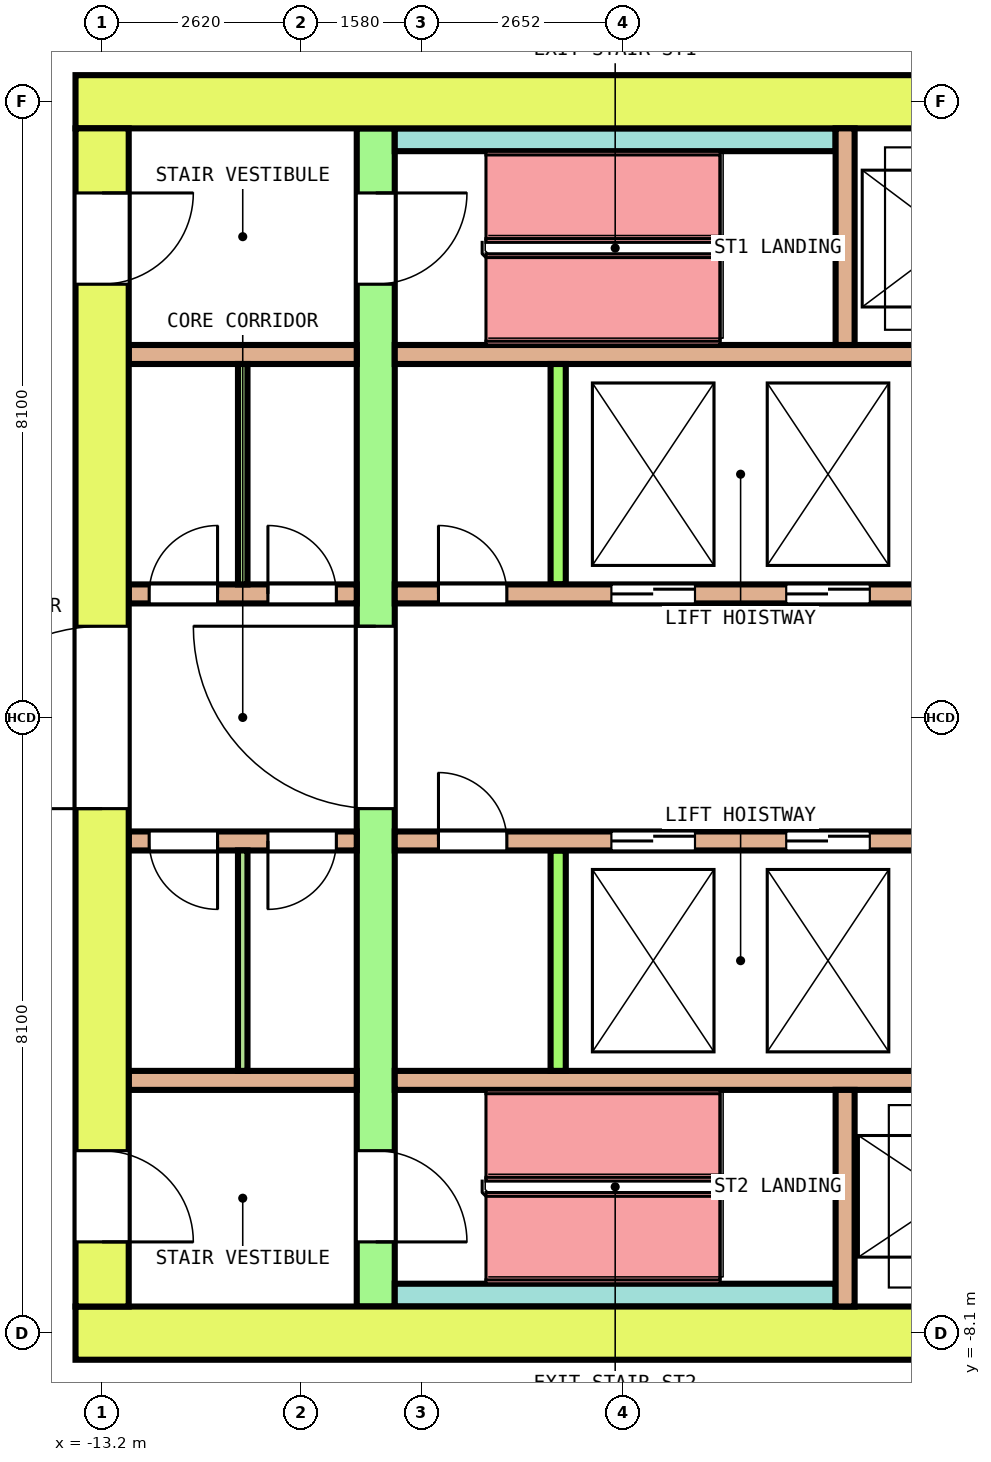
"""IFC4 building model, lengths in metres.
Left out: names, types, materials, properties, quantities, classifications, styles, units other than length and angle.
Written with IfcOpenShell. Run it as: python <this file> out.ifc"""

import sys

from ifc_helpers import new_model, si_unit, direction, frame, frame_2d, origin, place, context, subcontext, project, spatial, rectangle, extrude, element, fill, save


model = new_model("IFC4")
c1 = context("Model", 3, precision=1e-05, world=origin(), true_north=direction((0.0, 1.0)))
c2 = subcontext(c1, "Body", "Model", "MODEL_VIEW")
j1 = project(units=[si_unit("LENGTHUNIT", "METRE"), si_unit("PLANEANGLEUNIT", "RADIAN")], contexts=[c1])
p1 = place(None, origin())
s1 = spatial("IfcSite", under=j1, at=p1, CompositionType="ELEMENT")
p2 = place(p1, origin())
s2 = spatial("IfcBuilding", under=s1, at=p2, CompositionType="ELEMENT")
p3 = place(p2, frame((0.0, 0.0, 198.0)))
s3 = spatial("IfcBuildingStorey", under=s2, at=p3, CompositionType="ELEMENT", Elevation=198.0)
p4 = place(p3, frame((-13.55, 8.1, 0.0), z_axis=(0.0, 0.0, 1.0), x_axis=(1.0, 0.0, 0.0)))
e1 = element("IfcWall", 1, at=p4, inside=s3, PredefinedType="SHEAR", context=c2, shape_type="SweptSolid", body=[
    extrude(rectangle(XDim=27.1, YDim=0.7, at=frame_2d((13.55, 0.0))), origin(), (0.0, 0.0, 1.0), 4.1),
])
p5 = place(p4, frame((14.475, 0.0, 0.0)))
e2 = element("IfcOpeningElement", 2, at=p5, cuts=e1, PredefinedType="OPENING", context=c2, shape_type="SweptSolid", body=[
    extrude(rectangle(XDim=1.4, YDim=2.1, at=frame_2d((0.7, 1.05))), frame((0.0, 0.36, 0.0), z_axis=(0.0, -1.0, 0.0), x_axis=(1.0, 0.0, 0.0)), (0.0, 0.0, 1.0), 0.72),
])
p6 = place(p3, frame((-13.55, -8.1, 0.0), z_axis=(0.0, 0.0, 1.0), x_axis=(1.0, 0.0, 0.0)))
e3 = element("IfcWall", 3, at=p6, inside=s3, PredefinedType="SHEAR", context=c2, shape_type="SweptSolid", body=[
    extrude(rectangle(XDim=27.1, YDim=0.7, at=frame_2d((13.55, 0.0))), origin(), (0.0, 0.0, 1.0), 4.1),
])
p7 = place(p6, frame((15.1, 0.0, 0.0)))
e4 = element("IfcOpeningElement", 4, at=p7, cuts=e3, PredefinedType="OPENING", context=c2, shape_type="SweptSolid", body=[
    extrude(rectangle(XDim=1.2, YDim=2.1, at=frame_2d((0.6, 1.05))), frame((0.0, 0.36, 0.0), z_axis=(0.0, -1.0, 0.0), x_axis=(1.0, 0.0, 0.0)), (0.0, 0.0, 1.0), 0.72),
])
p8 = place(p3, frame((-13.2, -7.75, 0.0), z_axis=(0.0, 0.0, 1.0), x_axis=(0.0, 1.0, 0.0)))
e5 = element("IfcWall", 5, at=p8, inside=s3, PredefinedType="SHEAR", context=c2, shape_type="SweptSolid", body=[
    extrude(rectangle(XDim=15.5, YDim=0.7, at=frame_2d((7.75, 0.0))), origin(), (0.0, 0.0, 1.0), 4.1),
])
p9 = place(p8, frame((6.55, 0.0, 0.0)))
e6 = element("IfcOpeningElement", 6, at=p9, cuts=e5, PredefinedType="OPENING", context=c2, shape_type="SweptSolid", body=[
    extrude(rectangle(XDim=2.4, YDim=2.1, at=frame_2d((1.2, 1.05))), frame((0.0, 0.36, 0.0), z_axis=(0.0, -1.0, 0.0), x_axis=(1.0, 0.0, 0.0)), (0.0, 0.0, 1.0), 0.72),
])
p10 = place(p8, frame((13.45, 0.0, 0.0)))
e7 = element("IfcOpeningElement", 7, at=p10, cuts=e5, PredefinedType="OPENING", context=c2, shape_type="SweptSolid", body=[
    extrude(rectangle(XDim=1.2, YDim=2.1, at=frame_2d((0.6, 1.05))), frame((0.0, 0.36, 0.0), z_axis=(0.0, -1.0, 0.0), x_axis=(1.0, 0.0, 0.0)), (0.0, 0.0, 1.0), 0.72),
])
p11 = place(p8, frame((0.85, 0.0, 0.0)))
e8 = element("IfcOpeningElement", 8, at=p11, cuts=e5, PredefinedType="OPENING", context=c2, shape_type="SweptSolid", body=[
    extrude(rectangle(XDim=1.2, YDim=2.1, at=frame_2d((0.6, 1.05))), frame((0.0, 0.36, 0.0), z_axis=(0.0, -1.0, 0.0), x_axis=(1.0, 0.0, 0.0)), (0.0, 0.0, 1.0), 0.72),
])
p12 = place(p3, frame((-9.6, -7.75, 0.0), z_axis=(0.0, 0.0, 1.0), x_axis=(0.0, 1.0, 0.0)))
e9 = element("IfcWall", 9, at=p12, inside=s3, PredefinedType="SHEAR", context=c2, shape_type="SweptSolid", body=[
    extrude(rectangle(XDim=15.5, YDim=0.5, at=frame_2d((7.75, 0.0))), origin(), (0.0, 0.0, 1.0), 4.1),
])
p13 = place(p12, frame((6.55, 0.0, 0.0)))
e10 = element("IfcOpeningElement", 10, at=p13, cuts=e9, PredefinedType="OPENING", context=c2, shape_type="SweptSolid", body=[
    extrude(rectangle(XDim=2.4, YDim=2.1, at=frame_2d((1.2, 1.05))), frame((0.0, 0.26, 0.0), z_axis=(0.0, -1.0, 0.0), x_axis=(1.0, 0.0, 0.0)), (0.0, 0.0, 1.0), 0.52),
])
p14 = place(p12, frame((13.45, 0.0, 0.0)))
e11 = element("IfcOpeningElement", 11, at=p14, cuts=e9, PredefinedType="OPENING", context=c2, shape_type="SweptSolid", body=[
    extrude(rectangle(XDim=1.2, YDim=2.1, at=frame_2d((0.6, 1.05))), frame((0.0, 0.26, 0.0), z_axis=(0.0, -1.0, 0.0), x_axis=(1.0, 0.0, 0.0)), (0.0, 0.0, 1.0), 0.52),
])
p15 = place(p12, frame((0.85, 0.0, 0.0)))
e12 = element("IfcOpeningElement", 12, at=p15, cuts=e9, PredefinedType="OPENING", context=c2, shape_type="SweptSolid", body=[
    extrude(rectangle(XDim=1.2, YDim=2.1, at=frame_2d((0.6, 1.05))), frame((0.0, 0.26, 0.0), z_axis=(0.0, -1.0, 0.0), x_axis=(1.0, 0.0, 0.0)), (0.0, 0.0, 1.0), 0.52),
])
p16 = place(p3, frame((-12.85, 1.625, 0.0), z_axis=(0.0, 0.0, 1.0), x_axis=(1.0, 0.0, 0.0)))
e13 = element("IfcWall", 13, at=p16, inside=s3, PredefinedType="SOLIDWALL", context=c2, shape_type="SweptSolid", body=[
    extrude(rectangle(XDim=3.0, YDim=0.25, at=frame_2d((1.5, 0.0))), origin(), (0.0, 0.0, 1.0), 4.1),
])
p17 = place(p16, frame((0.269, 0.0, 0.0)))
e14 = element("IfcOpeningElement", 14, at=p17, cuts=e13, PredefinedType="OPENING", context=c2, shape_type="SweptSolid", body=[
    extrude(rectangle(XDim=0.9, YDim=2.1, at=frame_2d((0.45, 1.05))), frame((0.0, 0.135, 0.0), z_axis=(0.0, -1.0, 0.0), x_axis=(1.0, 0.0, 0.0)), (0.0, 0.0, 1.0), 0.27),
])
p18 = place(p16, frame((1.831, 0.0, 0.0)))
e15 = element("IfcOpeningElement", 15, at=p18, cuts=e13, PredefinedType="OPENING", context=c2, shape_type="SweptSolid", body=[
    extrude(rectangle(XDim=0.9, YDim=2.1, at=frame_2d((0.45, 1.05))), frame((0.0, 0.135, 0.0), z_axis=(0.0, -1.0, 0.0), x_axis=(1.0, 0.0, 0.0)), (0.0, 0.0, 1.0), 0.27),
])
p19 = place(p3, frame((-9.35, 1.625, 0.0), z_axis=(0.0, 0.0, 1.0), x_axis=(1.0, 0.0, 0.0)))
e16 = element("IfcWall", 16, at=p19, inside=s3, PredefinedType="SOLIDWALL", context=c2, shape_type="SweptSolid", body=[
    extrude(rectangle(XDim=18.7, YDim=0.25, at=frame_2d((9.35, 0.0))), origin(), (0.0, 0.0, 1.0), 4.1),
])
p20 = place(p19, frame((2.85, 0.0, 0.0)))
e17 = element("IfcOpeningElement", 17, at=p20, cuts=e16, PredefinedType="OPENING", context=c2, shape_type="SweptSolid", body=[
    extrude(rectangle(XDim=1.1, YDim=2.1, at=frame_2d((0.55, 1.05))), frame((0.0, 0.135, 0.0), z_axis=(0.0, -1.0, 0.0), x_axis=(1.0, 0.0, 0.0)), (0.0, 0.0, 1.0), 0.27),
])
p21 = place(p19, frame((5.15, 0.0, 0.0)))
e18 = element("IfcOpeningElement", 18, at=p21, cuts=e16, PredefinedType="OPENING", context=c2, shape_type="SweptSolid", body=[
    extrude(rectangle(XDim=1.1, YDim=2.1, at=frame_2d((0.55, 1.05))), frame((0.0, 0.135, 0.0), z_axis=(0.0, -1.0, 0.0), x_axis=(1.0, 0.0, 0.0)), (0.0, 0.0, 1.0), 0.27),
])
p22 = place(p19, frame((14.8, 0.0, 0.0)))
e19 = element("IfcOpeningElement", 19, at=p22, cuts=e16, PredefinedType="OPENING", context=c2, shape_type="SweptSolid", body=[
    extrude(rectangle(XDim=1.1, YDim=2.1, at=frame_2d((0.55, 1.05))), frame((0.0, 0.135, 0.0), z_axis=(0.0, -1.0, 0.0), x_axis=(1.0, 0.0, 0.0)), (0.0, 0.0, 1.0), 0.27),
])
p23 = place(p19, frame((0.575, 0.0, 0.0)))
e20 = element("IfcOpeningElement", 20, at=p23, cuts=e16, PredefinedType="OPENING", context=c2, shape_type="SweptSolid", body=[
    extrude(rectangle(XDim=0.9, YDim=2.1, at=frame_2d((0.45, 1.05))), frame((0.0, 0.135, 0.0), z_axis=(0.0, -1.0, 0.0), x_axis=(1.0, 0.0, 0.0)), (0.0, 0.0, 1.0), 0.27),
])
p24 = place(p19, frame((17.225, 0.0, 0.0)))
e21 = element("IfcOpeningElement", 21, at=p24, cuts=e16, PredefinedType="OPENING", context=c2, shape_type="SweptSolid", body=[
    extrude(rectangle(XDim=0.9, YDim=2.1, at=frame_2d((0.45, 1.05))), frame((0.0, 0.135, 0.0), z_axis=(0.0, -1.0, 0.0), x_axis=(1.0, 0.0, 0.0)), (0.0, 0.0, 1.0), 0.27),
])
p25 = place(p3, frame((-12.85, 4.775, 0.0), z_axis=(0.0, 0.0, 1.0), x_axis=(1.0, 0.0, 0.0)))
e22 = element("IfcWall", 22, at=p25, inside=s3, PredefinedType="SOLIDWALL", context=c2, shape_type="SweptSolid", body=[
    extrude(rectangle(XDim=3.0, YDim=0.25, at=frame_2d((1.5, 0.0))), origin(), (0.0, 0.0, 1.0), 4.1),
])
p26 = place(p3, frame((-9.35, 4.775, 0.0), z_axis=(0.0, 0.0, 1.0), x_axis=(1.0, 0.0, 0.0)))
e23 = element("IfcWall", 23, at=p26, inside=s3, PredefinedType="SOLIDWALL", context=c2, shape_type="SweptSolid", body=[
    extrude(rectangle(XDim=18.7, YDim=0.25, at=frame_2d((9.35, 0.0))), origin(), (0.0, 0.0, 1.0), 4.1),
])
p27 = place(p3, frame((-7.2, 1.75, 0.0), z_axis=(0.0, 0.0, 1.0), x_axis=(0.0, 1.0, 0.0)))
e24 = element("IfcWall", 24, at=p27, inside=s3, PredefinedType="SOLIDWALL", context=c2, shape_type="SweptSolid", body=[
    extrude(rectangle(XDim=2.9, YDim=0.2, at=frame_2d((1.45, 0.0))), origin(), (0.0, 0.0, 1.0), 4.1),
])
p28 = place(p3, frame((-12.85, -1.625, 0.0), z_axis=(0.0, 0.0, 1.0), x_axis=(1.0, 0.0, 0.0)))
e25 = element("IfcWall", 25, at=p28, inside=s3, PredefinedType="SOLIDWALL", context=c2, shape_type="SweptSolid", body=[
    extrude(rectangle(XDim=3.0, YDim=0.25, at=frame_2d((1.5, 0.0))), origin(), (0.0, 0.0, 1.0), 4.1),
])
p29 = place(p28, frame((0.269, 0.0, 0.0)))
e26 = element("IfcOpeningElement", 26, at=p29, cuts=e25, PredefinedType="OPENING", context=c2, shape_type="SweptSolid", body=[
    extrude(rectangle(XDim=0.9, YDim=2.1, at=frame_2d((0.45, 1.05))), frame((0.0, 0.135, 0.0), z_axis=(0.0, -1.0, 0.0), x_axis=(1.0, 0.0, 0.0)), (0.0, 0.0, 1.0), 0.27),
])
p30 = place(p28, frame((1.831, 0.0, 0.0)))
e27 = element("IfcOpeningElement", 27, at=p30, cuts=e25, PredefinedType="OPENING", context=c2, shape_type="SweptSolid", body=[
    extrude(rectangle(XDim=0.9, YDim=2.1, at=frame_2d((0.45, 1.05))), frame((0.0, 0.135, 0.0), z_axis=(0.0, -1.0, 0.0), x_axis=(1.0, 0.0, 0.0)), (0.0, 0.0, 1.0), 0.27),
])
p31 = place(p3, frame((-9.35, -1.625, 0.0), z_axis=(0.0, 0.0, 1.0), x_axis=(1.0, 0.0, 0.0)))
e28 = element("IfcWall", 28, at=p31, inside=s3, PredefinedType="SOLIDWALL", context=c2, shape_type="SweptSolid", body=[
    extrude(rectangle(XDim=18.7, YDim=0.25, at=frame_2d((9.35, 0.0))), origin(), (0.0, 0.0, 1.0), 4.1),
])
p32 = place(p31, frame((2.85, 0.0, 0.0)))
e29 = element("IfcOpeningElement", 29, at=p32, cuts=e28, PredefinedType="OPENING", context=c2, shape_type="SweptSolid", body=[
    extrude(rectangle(XDim=1.1, YDim=2.1, at=frame_2d((0.55, 1.05))), frame((0.0, 0.135, 0.0), z_axis=(0.0, -1.0, 0.0), x_axis=(1.0, 0.0, 0.0)), (0.0, 0.0, 1.0), 0.27),
])
p33 = place(p31, frame((5.15, 0.0, 0.0)))
e30 = element("IfcOpeningElement", 30, at=p33, cuts=e28, PredefinedType="OPENING", context=c2, shape_type="SweptSolid", body=[
    extrude(rectangle(XDim=1.1, YDim=2.1, at=frame_2d((0.55, 1.05))), frame((0.0, 0.135, 0.0), z_axis=(0.0, -1.0, 0.0), x_axis=(1.0, 0.0, 0.0)), (0.0, 0.0, 1.0), 0.27),
])
p34 = place(p31, frame((14.8, 0.0, 0.0)))
e31 = element("IfcOpeningElement", 31, at=p34, cuts=e28, PredefinedType="OPENING", context=c2, shape_type="SweptSolid", body=[
    extrude(rectangle(XDim=1.1, YDim=2.1, at=frame_2d((0.55, 1.05))), frame((0.0, 0.135, 0.0), z_axis=(0.0, -1.0, 0.0), x_axis=(1.0, 0.0, 0.0)), (0.0, 0.0, 1.0), 0.27),
])
p35 = place(p31, frame((0.575, 0.0, 0.0)))
e32 = element("IfcOpeningElement", 32, at=p35, cuts=e28, PredefinedType="OPENING", context=c2, shape_type="SweptSolid", body=[
    extrude(rectangle(XDim=0.9, YDim=2.1, at=frame_2d((0.45, 1.05))), frame((0.0, 0.135, 0.0), z_axis=(0.0, -1.0, 0.0), x_axis=(1.0, 0.0, 0.0)), (0.0, 0.0, 1.0), 0.27),
])
p36 = place(p31, frame((17.225, 0.0, 0.0)))
e33 = element("IfcOpeningElement", 33, at=p36, cuts=e28, PredefinedType="OPENING", context=c2, shape_type="SweptSolid", body=[
    extrude(rectangle(XDim=0.9, YDim=2.1, at=frame_2d((0.45, 1.05))), frame((0.0, 0.135, 0.0), z_axis=(0.0, -1.0, 0.0), x_axis=(1.0, 0.0, 0.0)), (0.0, 0.0, 1.0), 0.27),
])
p37 = place(p3, frame((-12.85, -4.775, 0.0), z_axis=(0.0, 0.0, 1.0), x_axis=(1.0, 0.0, 0.0)))
e34 = element("IfcWall", 34, at=p37, inside=s3, PredefinedType="SOLIDWALL", context=c2, shape_type="SweptSolid", body=[
    extrude(rectangle(XDim=3.0, YDim=0.25, at=frame_2d((1.5, 0.0))), origin(), (0.0, 0.0, 1.0), 4.1),
])
p38 = place(p3, frame((-9.35, -4.775, 0.0), z_axis=(0.0, 0.0, 1.0), x_axis=(1.0, 0.0, 0.0)))
e35 = element("IfcWall", 35, at=p38, inside=s3, PredefinedType="SOLIDWALL", context=c2, shape_type="SweptSolid", body=[
    extrude(rectangle(XDim=18.7, YDim=0.25, at=frame_2d((9.35, 0.0))), origin(), (0.0, 0.0, 1.0), 4.1),
])
p39 = place(p3, frame((-7.2, -4.65, 0.0), z_axis=(0.0, 0.0, 1.0), x_axis=(0.0, 1.0, 0.0)))
e36 = element("IfcWall", 36, at=p39, inside=s3, PredefinedType="SOLIDWALL", context=c2, shape_type="SweptSolid", body=[
    extrude(rectangle(XDim=2.9, YDim=0.2, at=frame_2d((1.45, 0.0))), origin(), (0.0, 0.0, 1.0), 4.1),
])
p40 = place(p3, frame((-9.35, 7.6, 0.0), z_axis=(0.0, 0.0, 1.0), x_axis=(1.0, 0.0, 0.0)))
e37 = element("IfcWall", 37, at=p40, inside=s3, PredefinedType="SOLIDWALL", context=c2, shape_type="SweptSolid", body=[
    extrude(rectangle(XDim=5.8, YDim=0.3, at=frame_2d((2.9, 0.0))), origin(), (0.0, 0.0, 1.0), 4.1),
])
p41 = place(p3, frame((-3.425, 4.9, 0.0), z_axis=(0.0, 0.0, 1.0), x_axis=(0.0, 1.0, 0.0)))
e38 = element("IfcWall", 38, at=p41, inside=s3, PredefinedType="SOLIDWALL", context=c2, shape_type="SweptSolid", body=[
    extrude(rectangle(XDim=2.85, YDim=0.25, at=frame_2d((1.425, 0.0))), origin(), (0.0, 0.0, 1.0), 4.1),
])
p42 = place(p3, frame((-9.35, -7.6, 0.0), z_axis=(0.0, 0.0, 1.0), x_axis=(1.0, 0.0, 0.0)))
e39 = element("IfcWall", 39, at=p42, inside=s3, PredefinedType="SOLIDWALL", context=c2, shape_type="SweptSolid", body=[
    extrude(rectangle(XDim=5.8, YDim=0.3, at=frame_2d((2.9, 0.0))), origin(), (0.0, 0.0, 1.0), 4.1),
])
p43 = place(p3, frame((-3.425, -7.75, 0.0), z_axis=(0.0, 0.0, 1.0), x_axis=(0.0, 1.0, 0.0)))
e40 = element("IfcWall", 40, at=p43, inside=s3, PredefinedType="SOLIDWALL", context=c2, shape_type="SweptSolid", body=[
    extrude(rectangle(XDim=2.85, YDim=0.25, at=frame_2d((1.425, 0.0))), origin(), (0.0, 0.0, 1.0), 4.1),
])
for number, where, z_axis, x_axis in (
    (41, (-11.35, 1.75, 0.0), (0.0, 0.0, 1.0), (0.0, 1.0, 0.0)),
    (42, (-11.35, -4.65, 0.0), (0.0, 0.0, 1.0), (0.0, 1.0, 0.0)),
):
    element("IfcWall", number, at=place(p3, frame(where, z_axis=z_axis, x_axis=x_axis)), inside=s3, PredefinedType="PARTITIONING", context=c2, shape_type="SweptSolid", body=[
        extrude(rectangle(XDim=2.9, YDim=0.125, at=frame_2d((1.45, 0.0))), origin(), (0.0, 0.0, 1.0), 4.1),
    ])
p44 = place(p20, origin())
e43 = element("IfcDoor", 43, at=p44, inside=s3, OperationType="DOUBLE_DOOR_SLIDING", PredefinedType="DOOR", context=c2, shape_type="SweptSolid", body=[
    extrude(rectangle(XDim=1.1, YDim=2.1, at=frame_2d((0.55, 1.05))), frame((0.0, 0.075, 0.0), z_axis=(0.0, -1.0, 0.0), x_axis=(1.0, 0.0, 0.0)), (0.0, 0.0, 1.0), 0.15),
])
fill(e17, e43)
p45 = place(p21, origin())
e44 = element("IfcDoor", 44, at=p45, inside=s3, OperationType="DOUBLE_DOOR_SLIDING", PredefinedType="DOOR", context=c2, shape_type="SweptSolid", body=[
    extrude(rectangle(XDim=1.1, YDim=2.1, at=frame_2d((0.55, 1.05))), frame((0.0, 0.075, 0.0), z_axis=(0.0, -1.0, 0.0), x_axis=(1.0, 0.0, 0.0)), (0.0, 0.0, 1.0), 0.15),
])
fill(e18, e44)
p46 = place(p32, origin())
e45 = element("IfcDoor", 45, at=p46, inside=s3, OperationType="DOUBLE_DOOR_SLIDING", PredefinedType="DOOR", context=c2, shape_type="SweptSolid", body=[
    extrude(rectangle(XDim=1.1, YDim=2.1, at=frame_2d((0.55, 1.05))), frame((0.0, 0.075, 0.0), z_axis=(0.0, -1.0, 0.0), x_axis=(1.0, 0.0, 0.0)), (0.0, 0.0, 1.0), 0.15),
])
fill(e29, e45)
p47 = place(p33, origin())
e46 = element("IfcDoor", 46, at=p47, inside=s3, OperationType="DOUBLE_DOOR_SLIDING", PredefinedType="DOOR", context=c2, shape_type="SweptSolid", body=[
    extrude(rectangle(XDim=1.1, YDim=2.1, at=frame_2d((0.55, 1.05))), frame((0.0, 0.075, 0.0), z_axis=(0.0, -1.0, 0.0), x_axis=(1.0, 0.0, 0.0)), (0.0, 0.0, 1.0), 0.15),
])
fill(e30, e46)
p48 = place(p13, origin())
e47 = element("IfcDoor", 47, at=p48, inside=s3, OperationType="DOUBLE_DOOR_SINGLE_SWING", PredefinedType="DOOR", context=c2, shape_type="SweptSolid", body=[
    extrude(rectangle(XDim=2.4, YDim=2.1, at=frame_2d((1.2, 1.05))), frame((0.0, 0.2, 0.0), z_axis=(0.0, -1.0, 0.0), x_axis=(1.0, 0.0, 0.0)), (0.0, 0.0, 1.0), 0.4),
])
fill(e10, e47)
p49 = place(p9, origin())
e48 = element("IfcDoor", 48, at=p49, inside=s3, OperationType="DOUBLE_DOOR_SINGLE_SWING", PredefinedType="DOOR", context=c2, shape_type="SweptSolid", body=[
    extrude(rectangle(XDim=2.4, YDim=2.1, at=frame_2d((1.2, 1.05))), frame((0.0, 0.3, 0.0), z_axis=(0.0, -1.0, 0.0), x_axis=(1.0, 0.0, 0.0)), (0.0, 0.0, 1.0), 0.6),
])
fill(e6, e48)
p50 = place(p14, origin())
e49 = element("IfcDoor", 49, at=p50, inside=s3, OperationType="SINGLE_SWING_RIGHT", PredefinedType="DOOR", context=c2, shape_type="SweptSolid", body=[
    extrude(rectangle(XDim=1.2, YDim=2.1, at=frame_2d((0.6, 1.05))), frame((0.0, 0.2, 0.0), z_axis=(0.0, -1.0, 0.0), x_axis=(1.0, 0.0, 0.0)), (0.0, 0.0, 1.0), 0.4),
])
fill(e11, e49)
p51 = place(p10, origin())
e50 = element("IfcDoor", 50, at=p51, inside=s3, OperationType="SINGLE_SWING_LEFT", PredefinedType="DOOR", context=c2, shape_type="SweptSolid", body=[
    extrude(rectangle(XDim=1.2, YDim=2.1, at=frame_2d((0.6, 1.05))), frame((0.0, 0.3, 0.0), z_axis=(0.0, -1.0, 0.0), x_axis=(1.0, 0.0, 0.0)), (0.0, 0.0, 1.0), 0.6),
])
fill(e7, e50)
p52 = place(p15, origin())
e51 = element("IfcDoor", 51, at=p52, inside=s3, OperationType="SINGLE_SWING_RIGHT", PredefinedType="DOOR", context=c2, shape_type="SweptSolid", body=[
    extrude(rectangle(XDim=1.2, YDim=2.1, at=frame_2d((0.6, 1.05))), frame((0.0, 0.2, 0.0), z_axis=(0.0, -1.0, 0.0), x_axis=(1.0, 0.0, 0.0)), (0.0, 0.0, 1.0), 0.4),
])
fill(e12, e51)
p53 = place(p11, origin())
e52 = element("IfcDoor", 52, at=p53, inside=s3, OperationType="SINGLE_SWING_LEFT", PredefinedType="DOOR", context=c2, shape_type="SweptSolid", body=[
    extrude(rectangle(XDim=1.2, YDim=2.1, at=frame_2d((0.6, 1.05))), frame((0.0, 0.3, 0.0), z_axis=(0.0, -1.0, 0.0), x_axis=(1.0, 0.0, 0.0)), (0.0, 0.0, 1.0), 0.6),
])
fill(e8, e52)
p54 = place(p17, origin())
e53 = element("IfcDoor", 53, at=p54, inside=s3, OperationType="SINGLE_SWING_RIGHT", PredefinedType="DOOR", context=c2, shape_type="SweptSolid", body=[
    extrude(rectangle(XDim=0.9, YDim=2.1, at=frame_2d((0.45, 1.05))), frame((0.0, 0.075, 0.0), z_axis=(0.0, -1.0, 0.0), x_axis=(1.0, 0.0, 0.0)), (0.0, 0.0, 1.0), 0.15),
])
fill(e14, e53)
p55 = place(p18, origin())
e54 = element("IfcDoor", 54, at=p55, inside=s3, OperationType="SINGLE_SWING_LEFT", PredefinedType="DOOR", context=c2, shape_type="SweptSolid", body=[
    extrude(rectangle(XDim=0.9, YDim=2.1, at=frame_2d((0.45, 1.05))), frame((0.0, 0.075, 0.0), z_axis=(0.0, -1.0, 0.0), x_axis=(1.0, 0.0, 0.0)), (0.0, 0.0, 1.0), 0.15),
])
fill(e15, e54)
p56 = place(p23, origin())
e55 = element("IfcDoor", 55, at=p56, inside=s3, OperationType="SINGLE_SWING_RIGHT", PredefinedType="DOOR", context=c2, shape_type="SweptSolid", body=[
    extrude(rectangle(XDim=0.9, YDim=2.1, at=frame_2d((0.45, 1.05))), frame((0.0, 0.075, 0.0), z_axis=(0.0, -1.0, 0.0), x_axis=(1.0, 0.0, 0.0)), (0.0, 0.0, 1.0), 0.15),
])
fill(e20, e55)
p57 = place(p29, origin())
e56 = element("IfcDoor", 56, at=p57, inside=s3, OperationType="SINGLE_SWING_RIGHT", PredefinedType="DOOR", context=c2, shape_type="SweptSolid", body=[
    extrude(rectangle(XDim=0.9, YDim=2.1, at=frame_2d((0.45, 1.05))), frame((0.0, 0.075, 0.0), z_axis=(0.0, -1.0, 0.0), x_axis=(1.0, 0.0, 0.0)), (0.0, 0.0, 1.0), 0.15),
])
fill(e26, e56)
p58 = place(p30, origin())
e57 = element("IfcDoor", 57, at=p58, inside=s3, OperationType="SINGLE_SWING_LEFT", PredefinedType="DOOR", context=c2, shape_type="SweptSolid", body=[
    extrude(rectangle(XDim=0.9, YDim=2.1, at=frame_2d((0.45, 1.05))), frame((0.0, 0.075, 0.0), z_axis=(0.0, -1.0, 0.0), x_axis=(1.0, 0.0, 0.0)), (0.0, 0.0, 1.0), 0.15),
])
fill(e27, e57)
p59 = place(p35, origin())
e58 = element("IfcDoor", 58, at=p59, inside=s3, OperationType="SINGLE_SWING_RIGHT", PredefinedType="DOOR", context=c2, shape_type="SweptSolid", body=[
    extrude(rectangle(XDim=0.9, YDim=2.1, at=frame_2d((0.45, 1.05))), frame((0.0, 0.075, 0.0), z_axis=(0.0, -1.0, 0.0), x_axis=(1.0, 0.0, 0.0)), (0.0, 0.0, 1.0), 0.15),
])
fill(e32, e58)
save(model, sys.argv[1])
